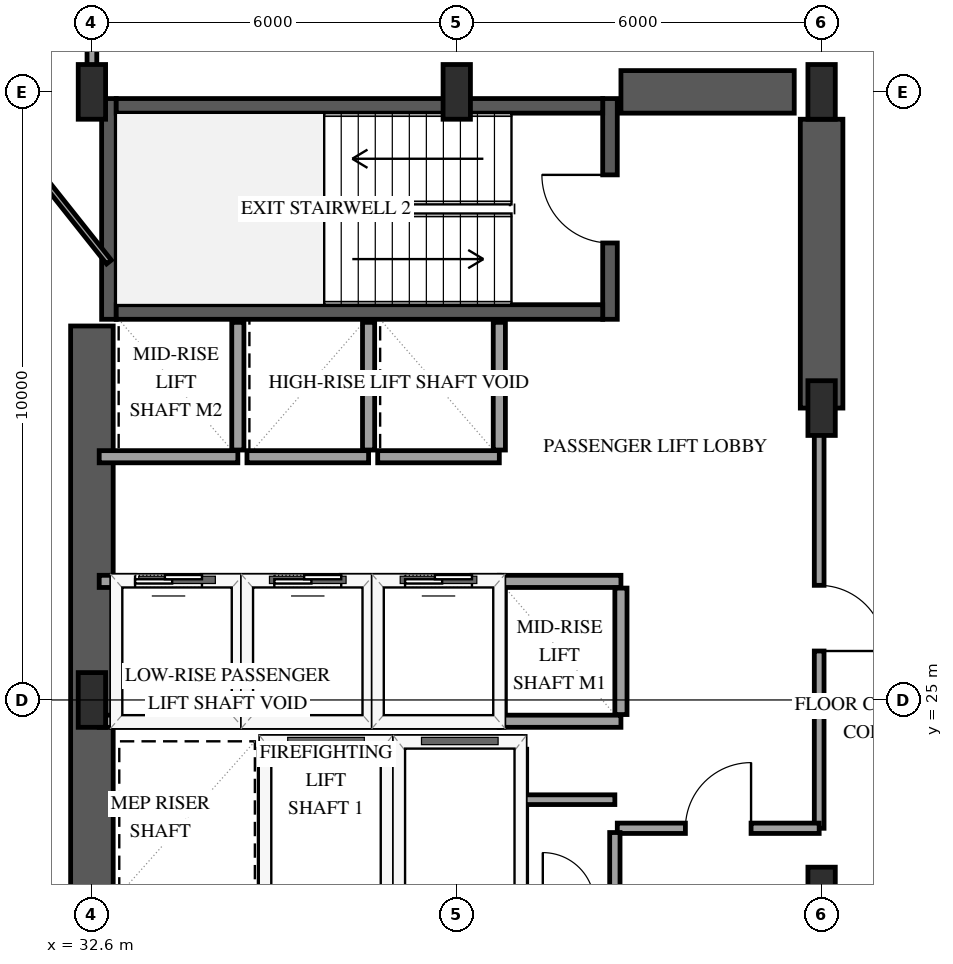
"""IFC4 building model, lengths in metres.
Left out: names, types, materials, properties, quantities, classifications, styles, units other than length and angle.
Written with IfcOpenShell. Run it as: python <this file> out.ifc"""

import sys

from ifc_helpers import new_model, si_unit, direction, frame, frame_2d, origin, origin_2d, place, context, subcontext, project, spatial, rectangle, extrude, element, fill, save


model = new_model("IFC4")
c1 = context("Model", 3, precision=1e-05, world=origin(), true_north=direction((0.0, 1.0)))
c2 = subcontext(c1, "Body", "Model", "MODEL_VIEW")
j1 = project(units=[si_unit("LENGTHUNIT", "METRE"), si_unit("PLANEANGLEUNIT", "RADIAN")], contexts=[c1])
p1 = place(None, origin())
s1 = spatial("IfcSite", under=j1, at=p1, CompositionType="ELEMENT")
p2 = place(p1, origin())
s2 = spatial("IfcBuilding", under=s1, at=p2, CompositionType="ELEMENT")
p3 = place(p2, frame((0.0, 0.0, 46.6)))
s3 = spatial("IfcBuildingStorey", under=s2, at=p3, CompositionType="ELEMENT", Elevation=46.6)
p4 = place(p3, frame((32.88, 31.26, 0.0), z_axis=(0.0, 0.0, 1.0), x_axis=(0.0, 1.0, 0.0)))
e1 = element("IfcWall", 1, at=p4, inside=s3, PredefinedType="SHEAR", context=c2, shape_type="SweptSolid", body=[
    extrude(rectangle(XDim=3.63, YDim=0.24, at=frame_2d((1.815, 0.0))), origin(), (0.0, 0.0, 1.0), 4.0),
])
p5 = place(p3, frame((41.12, 31.26, 0.0), z_axis=(0.0, 0.0, 1.0), x_axis=(0.0, 1.0, 0.0)))
e2 = element("IfcWall", 2, at=p5, inside=s3, PredefinedType="SHEAR", context=c2, shape_type="SweptSolid", body=[
    extrude(rectangle(XDim=3.63, YDim=0.24, at=frame_2d((1.815, 0.0))), origin(), (0.0, 0.0, 1.0), 4.0),
])
p6 = place(p5, frame((1.255, 0.0, 0.0)))
e3 = element("IfcOpeningElement", 3, at=p6, cuts=e2, PredefinedType="OPENING", context=c2, shape_type="SweptSolid", body=[
    extrude(rectangle(XDim=1.12, YDim=2.15, at=frame_2d((0.56, 1.075))), frame((0.0, 0.13, 0.0), z_axis=(0.0, -1.0, 0.0), x_axis=(1.0, 0.0, 0.0)), (0.0, 0.0, 1.0), 0.26),
])
for number, where, z_axis, x_axis in (
    (4, (33.0, 31.38, 0.0), (0.0, 0.0, 1.0), (1.0, 0.0, 0.0)),
    (5, (33.0, 34.77, 0.0), (0.0, 0.0, 1.0), (1.0, 0.0, 0.0)),
):
    element("IfcWall", number, at=place(p3, frame(where, z_axis=z_axis, x_axis=x_axis)), inside=s3, PredefinedType="SHEAR", context=c2, shape_type="SweptSolid", body=[
        extrude(rectangle(XDim=8.0, YDim=0.24, at=frame_2d((4.0, 0.0))), origin(), (0.0, 0.0, 1.0), 4.0),
    ])
p7 = place(p3, frame((32.6, 18.85, 0.0), z_axis=(0.0, 0.0, 1.0), x_axis=(0.0, 1.0, 0.0)))
e6 = element("IfcWall", 6, at=p7, inside=s3, PredefinedType="SHEAR", context=c2, shape_type="SweptSolid", body=[
    extrude(rectangle(XDim=12.3, YDim=0.7, at=frame_2d((6.15, 0.0))), origin(), (0.0, 0.0, 1.0), 4.0),
])
p8 = place(p3, frame((41.3, 35.0, 0.0), z_axis=(0.0, 0.0, 1.0), x_axis=(1.0, 0.0, 0.0)))
e7 = element("IfcWall", 7, at=p8, inside=s3, PredefinedType="SHEAR", context=c2, shape_type="SweptSolid", body=[
    extrude(rectangle(XDim=2.85, YDim=0.7, at=frame_2d((1.425, 0.0))), origin(), (0.0, 0.0, 1.0), 4.0),
])
p9 = place(p3, frame((44.6, 29.8, 0.0), z_axis=(0.0, 0.0, 1.0), x_axis=(0.0, 1.0, 0.0)))
e8 = element("IfcWall", 8, at=p9, inside=s3, PredefinedType="SHEAR", context=c2, shape_type="SweptSolid", body=[
    extrude(rectangle(XDim=4.75, YDim=0.7, at=frame_2d((2.375, 0.0))), origin(), (0.0, 0.0, 1.0), 4.0),
])
for number, where, z_axis, x_axis in (
    (9, (32.6, 25.0, 0.0), (0.0, 0.0, 1.0), (1.0, 0.0, 0.0)),
    (10, (32.6, 35.0, 0.0), (0.0, 0.0, 1.0), (1.0, 0.0, 0.0)),
    (11, (38.6, 35.0, 0.0), (0.0, 0.0, 1.0), (1.0, 0.0, 0.0)),
    (12, (44.6, 21.8, 0.0), (0.0, 0.0, 1.0), (1.0, 0.0, 0.0)),
    (13, (44.6, 29.8, 0.0), (0.0, 0.0, 1.0), (1.0, 0.0, 0.0)),
    (14, (44.6, 35.0, 0.0), (0.0, 0.0, 1.0), (1.0, 0.0, 0.0)),
):
    element("IfcColumn", number, at=place(p3, frame(where, z_axis=z_axis, x_axis=x_axis)), inside=s3, PredefinedType="PILASTER", context=c2, shape_type="SweptSolid", body=[
        extrude(rectangle(XDim=0.45, YDim=0.9, at=origin_2d()), origin(), (0.0, 0.0, 1.0), 4.0),
    ])
p10 = place(p3, frame((35.45, 24.3, 0.0), z_axis=(0.0, 0.0, 1.0), x_axis=(1.0, 0.0, 0.0)))
e15 = element("IfcWall", 15, at=p10, inside=s3, PredefinedType="SOLIDWALL", context=c2, shape_type="SweptSolid", body=[
    extrude(rectangle(XDim=2.0, YDim=0.2, at=frame_2d((1.0, 0.0))), origin(), (0.0, 0.0, 1.0), 3.7),
])
for number, where, z_axis, x_axis in (
    (16, (35.45, 21.81, 0.0), (0.0, 0.0, 1.0), (0.0, 1.0, 0.0)),
    (17, (37.45, 21.81, 0.0), (0.0, 0.0, 1.0), (0.0, 1.0, 0.0)),
):
    element("IfcWall", number, at=place(p3, frame(where, z_axis=z_axis, x_axis=x_axis)), inside=s3, PredefinedType="SOLIDWALL", context=c2, shape_type="SweptSolid", body=[
        extrude(rectangle(XDim=2.38, YDim=0.2, at=frame_2d((1.19, 0.0))), origin(), (0.0, 0.0, 1.0), 3.7),
    ])
p11 = place(p3, frame((37.65, 24.3, 0.0), z_axis=(0.0, 0.0, 1.0), x_axis=(1.0, 0.0, 0.0)))
e18 = element("IfcWall", 18, at=p11, inside=s3, PredefinedType="SOLIDWALL", context=c2, shape_type="SweptSolid", body=[
    extrude(rectangle(XDim=2.0, YDim=0.2, at=frame_2d((1.0, 0.0))), origin(), (0.0, 0.0, 1.0), 3.7),
])
p12 = place(p3, frame((39.65, 21.81, 0.0), z_axis=(0.0, 0.0, 1.0), x_axis=(0.0, 1.0, 0.0)))
e19 = element("IfcWall", 19, at=p12, inside=s3, PredefinedType="SOLIDWALL", context=c2, shape_type="SweptSolid", body=[
    extrude(rectangle(XDim=2.38, YDim=0.2, at=frame_2d((1.19, 0.0))), origin(), (0.0, 0.0, 1.0), 3.7),
])
p13 = place(p3, frame((32.72, 24.65, 0.0), z_axis=(0.0, 0.0, 1.0), x_axis=(1.0, 0.0, 0.0)))
e20 = element("IfcWall", 20, at=p13, inside=s3, PredefinedType="SOLIDWALL", context=c2, shape_type="SweptSolid", body=[
    extrude(rectangle(XDim=2.28, YDim=0.2, at=frame_2d((1.14, 0.0))), origin(), (0.0, 0.0, 1.0), 3.7),
])
p14 = place(p3, frame((32.72, 26.95, 0.0), z_axis=(0.0, 0.0, 1.0), x_axis=(1.0, 0.0, 0.0)))
e21 = element("IfcWall", 21, at=p14, inside=s3, PredefinedType="SOLIDWALL", context=c2, shape_type="SweptSolid", body=[
    extrude(rectangle(XDim=2.28, YDim=0.2, at=frame_2d((1.14, 0.0))), origin(), (0.0, 0.0, 1.0), 3.7),
])
p15 = place(p14, frame((0.59, 0.0, 0.0)))
e22 = element("IfcOpeningElement", 22, at=p15, cuts=e21, PredefinedType="OPENING", context=c2, shape_type="SweptSolid", body=[
    extrude(rectangle(XDim=1.1, YDim=2.15, at=frame_2d((0.55, 1.075))), frame((0.0, 0.11, 0.0), z_axis=(0.0, -1.0, 0.0), x_axis=(1.0, 0.0, 0.0)), (0.0, 0.0, 1.0), 0.22),
])
p16 = place(p3, frame((35.0, 24.76, 0.0), z_axis=(0.0, 0.0, 1.0), x_axis=(0.0, 1.0, 0.0)))
e23 = element("IfcWall", 23, at=p16, inside=s3, PredefinedType="SOLIDWALL", context=c2, shape_type="SweptSolid", body=[
    extrude(rectangle(XDim=2.08, YDim=0.2, at=frame_2d((1.04, 0.0))), origin(), (0.0, 0.0, 1.0), 3.7),
])
p17 = place(p3, frame((35.15, 24.65, 0.0), z_axis=(0.0, 0.0, 1.0), x_axis=(1.0, 0.0, 0.0)))
e24 = element("IfcWall", 24, at=p17, inside=s3, PredefinedType="SOLIDWALL", context=c2, shape_type="SweptSolid", body=[
    extrude(rectangle(XDim=2.0, YDim=0.2, at=frame_2d((1.0, 0.0))), origin(), (0.0, 0.0, 1.0), 3.7),
])
p18 = place(p3, frame((35.15, 26.95, 0.0), z_axis=(0.0, 0.0, 1.0), x_axis=(1.0, 0.0, 0.0)))
e25 = element("IfcWall", 25, at=p18, inside=s3, PredefinedType="SOLIDWALL", context=c2, shape_type="SweptSolid", body=[
    extrude(rectangle(XDim=2.0, YDim=0.2, at=frame_2d((1.0, 0.0))), origin(), (0.0, 0.0, 1.0), 3.7),
])
p19 = place(p18, frame((0.45, 0.0, 0.0)))
e26 = element("IfcOpeningElement", 26, at=p19, cuts=e25, PredefinedType="OPENING", context=c2, shape_type="SweptSolid", body=[
    extrude(rectangle(XDim=1.1, YDim=2.15, at=frame_2d((0.55, 1.075))), frame((0.0, 0.11, 0.0), z_axis=(0.0, -1.0, 0.0), x_axis=(1.0, 0.0, 0.0)), (0.0, 0.0, 1.0), 0.22),
])
p20 = place(p3, frame((37.15, 24.76, 0.0), z_axis=(0.0, 0.0, 1.0), x_axis=(0.0, 1.0, 0.0)))
e27 = element("IfcWall", 27, at=p20, inside=s3, PredefinedType="SOLIDWALL", context=c2, shape_type="SweptSolid", body=[
    extrude(rectangle(XDim=2.08, YDim=0.2, at=frame_2d((1.04, 0.0))), origin(), (0.0, 0.0, 1.0), 3.7),
])
p21 = place(p3, frame((37.3, 24.65, 0.0), z_axis=(0.0, 0.0, 1.0), x_axis=(1.0, 0.0, 0.0)))
e28 = element("IfcWall", 28, at=p21, inside=s3, PredefinedType="SOLIDWALL", context=c2, shape_type="SweptSolid", body=[
    extrude(rectangle(XDim=2.0, YDim=0.2, at=frame_2d((1.0, 0.0))), origin(), (0.0, 0.0, 1.0), 3.7),
])
p22 = place(p3, frame((37.3, 26.95, 0.0), z_axis=(0.0, 0.0, 1.0), x_axis=(1.0, 0.0, 0.0)))
e29 = element("IfcWall", 29, at=p22, inside=s3, PredefinedType="SOLIDWALL", context=c2, shape_type="SweptSolid", body=[
    extrude(rectangle(XDim=2.0, YDim=0.2, at=frame_2d((1.0, 0.0))), origin(), (0.0, 0.0, 1.0), 3.7),
])
p23 = place(p22, frame((0.45, 0.0, 0.0)))
e30 = element("IfcOpeningElement", 30, at=p23, cuts=e29, PredefinedType="OPENING", context=c2, shape_type="SweptSolid", body=[
    extrude(rectangle(XDim=1.1, YDim=2.15, at=frame_2d((0.55, 1.075))), frame((0.0, 0.11, 0.0), z_axis=(0.0, -1.0, 0.0), x_axis=(1.0, 0.0, 0.0)), (0.0, 0.0, 1.0), 0.22),
])
p24 = place(p3, frame((39.3, 24.76, 0.0), z_axis=(0.0, 0.0, 1.0), x_axis=(0.0, 1.0, 0.0)))
e31 = element("IfcWall", 31, at=p24, inside=s3, PredefinedType="SOLIDWALL", context=c2, shape_type="SweptSolid", body=[
    extrude(rectangle(XDim=2.08, YDim=0.2, at=frame_2d((1.04, 0.0))), origin(), (0.0, 0.0, 1.0), 3.7),
])
for number, where, z_axis, x_axis in (
    (32, (39.3, 24.65, 0.0), (0.0, 0.0, 1.0), (1.0, 0.0, 0.0)),
    (33, (39.3, 26.95, 0.0), (0.0, 0.0, 1.0), (1.0, 0.0, 0.0)),
):
    element("IfcWall", number, at=place(p3, frame(where, z_axis=z_axis, x_axis=x_axis)), inside=s3, PredefinedType="SOLIDWALL", context=c2, shape_type="SweptSolid", body=[
        extrude(rectangle(XDim=2.0, YDim=0.2, at=frame_2d((1.0, 0.0))), origin(), (0.0, 0.0, 1.0), 3.7),
    ])
p25 = place(p3, frame((41.3, 24.76, 0.0), z_axis=(0.0, 0.0, 1.0), x_axis=(0.0, 1.0, 0.0)))
e34 = element("IfcWall", 34, at=p25, inside=s3, PredefinedType="SOLIDWALL", context=c2, shape_type="SweptSolid", body=[
    extrude(rectangle(XDim=2.08, YDim=0.2, at=frame_2d((1.04, 0.0))), origin(), (0.0, 0.0, 1.0), 3.7),
])
p26 = place(p3, frame((32.72, 29.0, 0.0), z_axis=(0.0, 0.0, 1.0), x_axis=(1.0, 0.0, 0.0)))
e35 = element("IfcWall", 35, at=p26, inside=s3, PredefinedType="SOLIDWALL", context=c2, shape_type="SweptSolid", body=[
    extrude(rectangle(XDim=2.28, YDim=0.2, at=frame_2d((1.14, 0.0))), origin(), (0.0, 0.0, 1.0), 3.7),
])
p27 = place(p3, frame((35.0, 29.11, 0.0), z_axis=(0.0, 0.0, 1.0), x_axis=(0.0, 1.0, 0.0)))
e36 = element("IfcWall", 36, at=p27, inside=s3, PredefinedType="SOLIDWALL", context=c2, shape_type="SweptSolid", body=[
    extrude(rectangle(XDim=2.1, YDim=0.2, at=frame_2d((1.05, 0.0))), origin(), (0.0, 0.0, 1.0), 3.7),
])
p28 = place(p3, frame((35.15, 29.0, 0.0), z_axis=(0.0, 0.0, 1.0), x_axis=(1.0, 0.0, 0.0)))
e37 = element("IfcWall", 37, at=p28, inside=s3, PredefinedType="SOLIDWALL", context=c2, shape_type="SweptSolid", body=[
    extrude(rectangle(XDim=2.0, YDim=0.2, at=frame_2d((1.0, 0.0))), origin(), (0.0, 0.0, 1.0), 3.7),
])
p29 = place(p3, frame((37.15, 29.11, 0.0), z_axis=(0.0, 0.0, 1.0), x_axis=(0.0, 1.0, 0.0)))
e38 = element("IfcWall", 38, at=p29, inside=s3, PredefinedType="SOLIDWALL", context=c2, shape_type="SweptSolid", body=[
    extrude(rectangle(XDim=2.1, YDim=0.2, at=frame_2d((1.05, 0.0))), origin(), (0.0, 0.0, 1.0), 3.7),
])
p30 = place(p3, frame((37.3, 29.0, 0.0), z_axis=(0.0, 0.0, 1.0), x_axis=(1.0, 0.0, 0.0)))
e39 = element("IfcWall", 39, at=p30, inside=s3, PredefinedType="SOLIDWALL", context=c2, shape_type="SweptSolid", body=[
    extrude(rectangle(XDim=2.0, YDim=0.2, at=frame_2d((1.0, 0.0))), origin(), (0.0, 0.0, 1.0), 3.7),
])
p31 = place(p3, frame((39.3, 29.11, 0.0), z_axis=(0.0, 0.0, 1.0), x_axis=(0.0, 1.0, 0.0)))
e40 = element("IfcWall", 40, at=p31, inside=s3, PredefinedType="SOLIDWALL", context=c2, shape_type="SweptSolid", body=[
    extrude(rectangle(XDim=2.1, YDim=0.2, at=frame_2d((1.05, 0.0))), origin(), (0.0, 0.0, 1.0), 3.7),
])
p32 = place(p3, frame((32.88, 32.202, 0.0), z_axis=(0.0, 0.0, 1.0), x_axis=(-0.62182955162, 0.783152608839, 0.0)))
e41 = element("IfcWall", 41, at=p32, inside=s3, PredefinedType="PARTITIONING", context=c2, shape_type="SweptSolid", body=[
    extrude(rectangle(XDim=7.117, YDim=0.1, at=frame_2d((3.559, 0.0))), origin(), (0.0, 0.0, 1.0), 3.7),
])
p33 = place(p3, frame((44.56, 29.8, 0.0), z_axis=(0.0, 0.0, 1.0), x_axis=(0.0, -1.0, 0.0)))
e42 = element("IfcWall", 42, at=p33, inside=s3, PredefinedType="PARTITIONING", context=c2, shape_type="SweptSolid", body=[
    extrude(rectangle(XDim=6.91, YDim=0.16, at=frame_2d((3.455, 0.0))), origin(), (0.0, 0.0, 1.0), 2.74),
])
p34 = place(p33, frame((2.915, 0.0, 0.0)))
e43 = element("IfcOpeningElement", 43, at=p34, cuts=e42, PredefinedType="OPENING", context=c2, shape_type="SweptSolid", body=[
    extrude(rectangle(XDim=1.08, YDim=2.15, at=frame_2d((0.54, 1.075))), frame((0.0, 0.09, 0.0), z_axis=(0.0, -1.0, 0.0), x_axis=(1.0, 0.0, 0.0)), (0.0, 0.0, 1.0), 0.18),
])
p35 = place(p3, frame((41.24, 22.89, 0.0), z_axis=(0.0, 0.0, 1.0), x_axis=(1.0, 0.0, 0.0)))
e44 = element("IfcWall", 44, at=p35, inside=s3, PredefinedType="PARTITIONING", context=c2, shape_type="SweptSolid", body=[
    extrude(rectangle(XDim=3.32, YDim=0.17, at=frame_2d((1.66, 0.0))), origin(), (0.0, 0.0, 1.0), 3.7),
])
p36 = place(p35, frame((1.12, 0.0, 0.0)))
e45 = element("IfcOpeningElement", 45, at=p36, cuts=e44, PredefinedType="OPENING", context=c2, shape_type="SweptSolid", body=[
    extrude(rectangle(XDim=1.08, YDim=2.15, at=frame_2d((0.54, 1.075))), frame((0.0, 0.095, 0.0), z_axis=(0.0, -1.0, 0.0), x_axis=(1.0, 0.0, 0.0)), (0.0, 0.0, 1.0), 0.19),
])
p37 = place(p3, frame((32.6, 35.07, 0.0), z_axis=(0.0, 0.0, 1.0), x_axis=(0.0, 1.0, 0.0)))
e46 = element("IfcWall", 46, at=p37, inside=s3, PredefinedType="PARTITIONING", context=c2, shape_type="SweptSolid", body=[
    extrude(rectangle(XDim=1.91, YDim=0.16, at=frame_2d((0.955, 0.0))), origin(), (0.0, 0.0, 1.0), 3.7),
])
p38 = place(p3, frame((41.2, 21.7, 0.0), z_axis=(0.0, 0.0, 1.0), x_axis=(0.0, 1.0, 0.0)))
e47 = element("IfcWall", 47, at=p38, inside=s3, PredefinedType="PARTITIONING", context=c2, shape_type="SweptSolid", body=[
    extrude(rectangle(XDim=1.12, YDim=0.17, at=frame_2d((0.56, 0.0))), origin(), (0.0, 0.0, 1.0), 3.7),
])
p39 = place(p3, frame((41.2, 23.36, 0.0), z_axis=(0.0, 0.0, 1.0), x_axis=(-1.0, 0.0, 0.0)))
e48 = element("IfcWall", 48, at=p39, inside=s3, PredefinedType="PARTITIONING", context=c2, shape_type="SweptSolid", body=[
    extrude(rectangle(XDim=1.48, YDim=0.16, at=frame_2d((0.74, 0.0))), origin(), (0.0, 0.0, 1.0), 3.7),
])
p40 = place(p15, origin())
e49 = element("IfcDoor", 49, at=p40, inside=s3, OperationType="SLIDING_TO_LEFT", PredefinedType="DOOR", context=c2, shape_type="SweptSolid", body=[
    extrude(rectangle(XDim=1.1, YDim=2.15, at=frame_2d((0.55, 1.075))), frame((0.0, 0.025, 0.0), z_axis=(0.0, -1.0, 0.0), x_axis=(1.0, 0.0, 0.0)), (0.0, 0.0, 1.0), 0.05),
])
fill(e22, e49)
p41 = place(p19, origin())
e50 = element("IfcDoor", 50, at=p41, inside=s3, OperationType="SLIDING_TO_LEFT", PredefinedType="DOOR", context=c2, shape_type="SweptSolid", body=[
    extrude(rectangle(XDim=1.1, YDim=2.15, at=frame_2d((0.55, 1.075))), frame((0.0, 0.025, 0.0), z_axis=(0.0, -1.0, 0.0), x_axis=(1.0, 0.0, 0.0)), (0.0, 0.0, 1.0), 0.05),
])
fill(e26, e50)
p42 = place(p23, origin())
e51 = element("IfcDoor", 51, at=p42, inside=s3, OperationType="SLIDING_TO_LEFT", PredefinedType="DOOR", context=c2, shape_type="SweptSolid", body=[
    extrude(rectangle(XDim=1.1, YDim=2.15, at=frame_2d((0.55, 1.075))), frame((0.0, 0.025, 0.0), z_axis=(0.0, -1.0, 0.0), x_axis=(1.0, 0.0, 0.0)), (0.0, 0.0, 1.0), 0.05),
])
fill(e30, e51)
p43 = place(p6, origin())
e52 = element("IfcDoor", 52, at=p43, inside=s3, OperationType="SINGLE_SWING_RIGHT", PredefinedType="DOOR", context=c2, shape_type="SweptSolid", body=[
    extrude(rectangle(XDim=1.12, YDim=2.15, at=frame_2d((0.56, 1.075))), frame((0.0, 0.025, 0.0), z_axis=(0.0, -1.0, 0.0), x_axis=(1.0, 0.0, 0.0)), (0.0, 0.0, 1.0), 0.05),
])
fill(e3, e52)
p44 = place(p34, origin())
e53 = element("IfcDoor", 53, at=p44, inside=s3, OperationType="SINGLE_SWING_RIGHT", PredefinedType="DOOR", context=c2, shape_type="SweptSolid", body=[
    extrude(rectangle(XDim=1.08, YDim=2.15, at=frame_2d((0.54, 1.075))), frame((0.0, 0.025, 0.0), z_axis=(0.0, -1.0, 0.0), x_axis=(1.0, 0.0, 0.0)), (0.0, 0.0, 1.0), 0.05),
])
fill(e43, e53)
p45 = place(p36, origin())
e54 = element("IfcDoor", 54, at=p45, inside=s3, OperationType="SINGLE_SWING_RIGHT", PredefinedType="DOOR", context=c2, shape_type="SweptSolid", body=[
    extrude(rectangle(XDim=1.08, YDim=2.15, at=frame_2d((0.54, 1.075))), frame((0.0, 0.025, 0.0), z_axis=(0.0, -1.0, 0.0), x_axis=(1.0, 0.0, 0.0)), (0.0, 0.0, 1.0), 0.05),
])
fill(e45, e54)
save(model, sys.argv[1])
